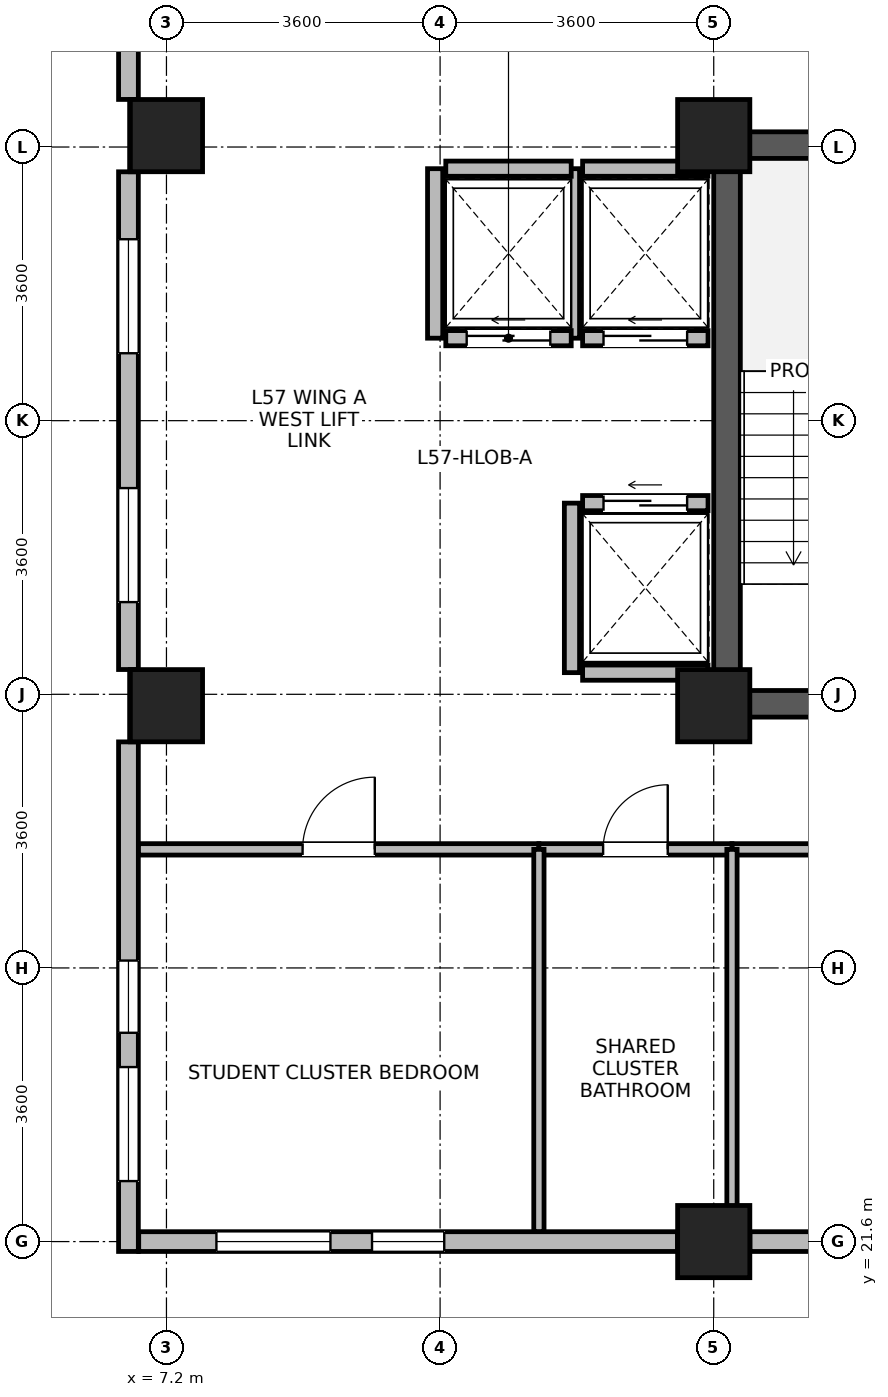
"""IFC4 building model, lengths in metres.
Left out: names, types, materials, properties, quantities, classifications, styles, units other than length and angle.
Written with IfcOpenShell. Run it as: python <this file> out.ifc"""

import sys

from ifc_helpers import new_model, si_unit, direction, frame, frame_2d, origin, origin_2d, place, context, subcontext, project, spatial, rectangle, extrude, source, transform, mapped, element, fill, save


model = new_model("IFC4")
c1 = context("Model", 3, precision=1e-05, world=origin(), true_north=direction((0.0, 1.0)))
c2 = subcontext(c1, "Body", "Model", "MODEL_VIEW")
j1 = project(units=[si_unit("LENGTHUNIT", "METRE"), si_unit("PLANEANGLEUNIT", "RADIAN")], contexts=[c1])
p1 = place(None, origin())
s1 = spatial("IfcSite", under=j1, at=p1, CompositionType="ELEMENT")
p2 = place(p1, origin())
s2 = spatial("IfcBuilding", under=s1, at=p2, CompositionType="ELEMENT")
p3 = place(p2, frame((0.0, 0.0, 224.0)))
s3 = spatial("IfcBuildingStorey", under=s2, at=p3, CompositionType="ELEMENT", Elevation=224.0)
p4 = place(p3, frame((14.575, 28.5, 0.0), z_axis=(0.0, 0.0, 1.0), x_axis=(0.0, 1.0, 0.0)))
e1 = element("IfcWall", 1, at=p4, inside=s3, PredefinedType="SHEAR", context=c2, shape_type="SweptSolid", body=[
    extrude(rectangle(XDim=7.7, YDim=0.35, at=frame_2d((3.85, 0.0))), origin(), (0.0, 0.0, 1.0), 3.47),
])
for number, where, z_axis, x_axis in (
    (2, (14.75, 28.675, 0.0), (0.0, 0.0, 1.0), (1.0, 0.0, 0.0)),
    (3, (14.75, 36.025, 0.0), (0.0, 0.0, 1.0), (1.0, 0.0, 0.0)),
):
    element("IfcWall", number, at=place(p3, frame(where, z_axis=z_axis, x_axis=x_axis)), inside=s3, PredefinedType="SHEAR", context=c2, shape_type="SweptSolid", body=[
        extrude(rectangle(XDim=3.2, YDim=0.35, at=frame_2d((1.6, 0.0))), origin(), (0.0, 0.0, 1.0), 3.47),
    ])
m1 = source(origin(), c2, "Body", "SweptSolid", [
    extrude(rectangle(XDim=0.95, YDim=0.95, at=origin_2d()), origin(), (0.0, 0.0, 1.0), 3.7),
])
for number, where, z_axis, x_axis in (
    (4, (7.2, 28.65, 0.0), (0.0, 0.0, 1.0), (1.0, 0.0, 0.0)),
    (5, (7.2, 36.15, 0.0), (0.0, 0.0, 1.0), (1.0, 0.0, 0.0)),
    (6, (14.4, 21.6, 0.0), (0.0, 0.0, 1.0), (1.0, 0.0, 0.0)),
    (7, (14.4, 28.65, 0.0), (0.0, 0.0, 1.0), (1.0, 0.0, 0.0)),
    (8, (14.4, 36.15, 0.0), (0.0, 0.0, 1.0), (1.0, 0.0, 0.0)),
):
    element("IfcColumn", number, at=place(p3, frame(where, z_axis=z_axis, x_axis=x_axis)), inside=s3, PredefinedType="COLUMN", context=c2, shape_type="MappedRepresentation", body=[
        mapped(m1, transform((0.0, 0.0, 0.0), x_axis=(1.0, 0.0, 0.0), y_axis=(0.0, 1.0, 0.0), z_axis=(0.0, 0.0, 1.0), scale=1.0)),
    ])
p5 = place(p3, frame((6.7, 36.626, 0.0), z_axis=(0.0, 0.0, 1.0), x_axis=(0.0, 1.0, 0.0)))
e9 = element("IfcWall", 9, at=p5, inside=s3, PredefinedType="STANDARD", context=c2, shape_type="SweptSolid", body=[
    extrude(rectangle(XDim=3.104, YDim=0.26, at=frame_2d((1.552, 0.0))), origin(), (0.0, 0.0, 1.0), 3.45),
])
p6 = place(p5, frame((0.802, 0.0, 0.85)))
e10 = element("IfcOpeningElement", 10, at=p6, cuts=e9, PredefinedType="OPENING", context=c2, shape_type="SweptSolid", body=[
    extrude(rectangle(XDim=1.5, YDim=1.85, at=frame_2d((0.75, 0.925))), frame((0.0, 0.14, 0.0), z_axis=(0.0, -1.0, 0.0), x_axis=(1.0, 0.0, 0.0)), (0.0, 0.0, 1.0), 0.28),
])
p7 = place(p3, frame((6.7, 29.126, 0.0), z_axis=(0.0, 0.0, 1.0), x_axis=(0.0, 1.0, 0.0)))
e11 = element("IfcWall", 11, at=p7, inside=s3, PredefinedType="STANDARD", context=c2, shape_type="SweptSolid", body=[
    extrude(rectangle(XDim=6.548, YDim=0.26, at=frame_2d((3.274, 0.0))), origin(), (0.0, 0.0, 1.0), 3.45),
])
p8 = place(p7, frame((0.887, 0.0, 0.85)))
e12 = element("IfcOpeningElement", 12, at=p8, cuts=e11, PredefinedType="OPENING", context=c2, shape_type="SweptSolid", body=[
    extrude(rectangle(XDim=1.5, YDim=1.85, at=frame_2d((0.75, 0.925))), frame((0.0, 0.14, 0.0), z_axis=(0.0, -1.0, 0.0), x_axis=(1.0, 0.0, 0.0)), (0.0, 0.0, 1.0), 0.28),
])
p9 = place(p7, frame((4.161, 0.0, 0.85)))
e13 = element("IfcOpeningElement", 13, at=p9, cuts=e11, PredefinedType="OPENING", context=c2, shape_type="SweptSolid", body=[
    extrude(rectangle(XDim=1.5, YDim=1.85, at=frame_2d((0.75, 0.925))), frame((0.0, 0.14, 0.0), z_axis=(0.0, -1.0, 0.0), x_axis=(1.0, 0.0, 0.0)), (0.0, 0.0, 1.0), 0.28),
])
p10 = place(p3, frame((6.7, 21.47, 0.0), z_axis=(0.0, 0.0, 1.0), x_axis=(0.0, 1.0, 0.0)))
e14 = element("IfcWall", 14, at=p10, inside=s3, PredefinedType="STANDARD", context=c2, shape_type="SweptSolid", body=[
    extrude(rectangle(XDim=6.704, YDim=0.26, at=frame_2d((3.352, 0.0))), origin(), (0.0, 0.0, 1.0), 3.45),
])
p11 = place(p10, frame((0.926, 0.0, 0.85)))
e15 = element("IfcOpeningElement", 15, at=p11, cuts=e14, PredefinedType="OPENING", context=c2, shape_type="SweptSolid", body=[
    extrude(rectangle(XDim=1.5, YDim=1.85, at=frame_2d((0.75, 0.925))), frame((0.0, 0.14, 0.0), z_axis=(0.0, -1.0, 0.0), x_axis=(1.0, 0.0, 0.0)), (0.0, 0.0, 1.0), 0.28),
])
p12 = place(p10, frame((2.877, 0.0, 0.85)))
e16 = element("IfcOpeningElement", 16, at=p12, cuts=e14, PredefinedType="OPENING", context=c2, shape_type="SweptSolid", body=[
    extrude(rectangle(XDim=0.95, YDim=1.75, at=frame_2d((0.475, 0.875))), frame((0.0, 0.14, 0.0), z_axis=(0.0, -1.0, 0.0), x_axis=(1.0, 0.0, 0.0)), (0.0, 0.0, 1.0), 0.28),
])
p13 = place(p3, frame((13.924, 21.6, 0.0), z_axis=(0.0, 0.0, 1.0), x_axis=(-1.0, 0.0, 0.0)))
e17 = element("IfcWall", 17, at=p13, inside=s3, PredefinedType="STANDARD", context=c2, shape_type="SweptSolid", body=[
    extrude(rectangle(XDim=7.089, YDim=0.26, at=frame_2d((3.544, 0.0))), origin(), (0.0, 0.0, 1.0), 3.45),
])
p14 = place(p13, frame((4.567, 0.0, 0.85)))
e18 = element("IfcOpeningElement", 18, at=p14, cuts=e17, PredefinedType="OPENING", context=c2, shape_type="SweptSolid", body=[
    extrude(rectangle(XDim=1.5, YDim=1.85, at=frame_2d((0.75, 0.925))), frame((0.0, 0.14, 0.0), z_axis=(0.0, -1.0, 0.0), x_axis=(1.0, 0.0, 0.0)), (0.0, 0.0, 1.0), 0.28),
])
p15 = place(p13, frame((3.07, 0.0, 0.85)))
e19 = element("IfcOpeningElement", 19, at=p15, cuts=e17, PredefinedType="OPENING", context=c2, shape_type="SweptSolid", body=[
    extrude(rectangle(XDim=0.95, YDim=1.75, at=frame_2d((0.475, 0.875))), frame((0.0, 0.14, 0.0), z_axis=(0.0, -1.0, 0.0), x_axis=(1.0, 0.0, 0.0)), (0.0, 0.0, 1.0), 0.28),
])
p16 = place(p3, frame((17.8, 21.6, 0.0), z_axis=(0.0, 0.0, 1.0), x_axis=(-1.0, 0.0, 0.0)))
e20 = element("IfcWall", 20, at=p16, inside=s3, PredefinedType="STANDARD", context=c2, shape_type="SweptSolid", body=[
    extrude(rectangle(XDim=2.924, YDim=0.26, at=frame_2d((1.462, 0.0))), origin(), (0.0, 0.0, 1.0), 3.05),
])
p17 = place(p16, frame((0.987, 0.0, 0.85)))
e21 = element("IfcOpeningElement", 21, at=p17, cuts=e20, PredefinedType="OPENING", context=c2, shape_type="SweptSolid", body=[
    extrude(rectangle(XDim=0.95, YDim=1.75, at=frame_2d((0.475, 0.875))), frame((0.0, 0.14, 0.0), z_axis=(0.0, -1.0, 0.0), x_axis=(1.0, 0.0, 0.0)), (0.0, 0.0, 1.0), 0.28),
])
p18 = place(p3, frame((12.675, 33.485, 0.0), z_axis=(0.0, 0.0, 1.0), x_axis=(1.0, 0.0, 0.0)))
e22 = element("IfcWall", 22, at=p18, inside=s3, PredefinedType="PARTITIONING", context=c2, shape_type="SweptSolid", body=[
    extrude(rectangle(XDim=1.65, YDim=0.2, at=frame_2d((0.825, 0.0))), origin(), (0.0, 0.0, 1.0), 3.45),
])
p19 = place(p18, frame((0.275, 0.0, 0.0)))
e23 = element("IfcOpeningElement", 23, at=p19, cuts=e22, PredefinedType="OPENING", context=c2, shape_type="SweptSolid", body=[
    extrude(rectangle(XDim=1.1, YDim=2.12, at=frame_2d((0.55, 1.06))), frame((0.0, 0.11, 0.0), z_axis=(0.0, -1.0, 0.0), x_axis=(1.0, 0.0, 0.0)), (0.0, 0.0, 1.0), 0.22),
])
p20 = place(p3, frame((12.675, 35.715, 0.0), z_axis=(0.0, 0.0, 1.0), x_axis=(1.0, 0.0, 0.0)))
e24 = element("IfcWall", 24, at=p20, inside=s3, PredefinedType="PARTITIONING", context=c2, shape_type="SweptSolid", body=[
    extrude(rectangle(XDim=1.65, YDim=0.2, at=frame_2d((0.825, 0.0))), origin(), (0.0, 0.0, 1.0), 3.45),
])
p21 = place(p3, frame((12.535, 33.485, 0.0), z_axis=(0.0, 0.0, 1.0), x_axis=(0.0, 1.0, 0.0)))
e25 = element("IfcWall", 25, at=p21, inside=s3, PredefinedType="PARTITIONING", context=c2, shape_type="SweptSolid", body=[
    extrude(rectangle(XDim=2.23, YDim=0.2, at=frame_2d((1.115, 0.0))), origin(), (0.0, 0.0, 1.0), 3.45),
])
p22 = place(p3, frame((12.675, 29.085, 0.0), z_axis=(0.0, 0.0, 1.0), x_axis=(1.0, 0.0, 0.0)))
e26 = element("IfcWall", 26, at=p22, inside=s3, PredefinedType="PARTITIONING", context=c2, shape_type="SweptSolid", body=[
    extrude(rectangle(XDim=1.65, YDim=0.2, at=frame_2d((0.825, 0.0))), origin(), (0.0, 0.0, 1.0), 3.45),
])
p23 = place(p3, frame((12.675, 31.315, 0.0), z_axis=(0.0, 0.0, 1.0), x_axis=(1.0, 0.0, 0.0)))
e27 = element("IfcWall", 27, at=p23, inside=s3, PredefinedType="PARTITIONING", context=c2, shape_type="SweptSolid", body=[
    extrude(rectangle(XDim=1.65, YDim=0.2, at=frame_2d((0.825, 0.0))), origin(), (0.0, 0.0, 1.0), 3.45),
])
p24 = place(p23, frame((0.275, 0.0, 0.0)))
e28 = element("IfcOpeningElement", 28, at=p24, cuts=e27, PredefinedType="OPENING", context=c2, shape_type="SweptSolid", body=[
    extrude(rectangle(XDim=1.1, YDim=2.12, at=frame_2d((0.55, 1.06))), frame((0.0, 0.11, 0.0), z_axis=(0.0, -1.0, 0.0), x_axis=(1.0, 0.0, 0.0)), (0.0, 0.0, 1.0), 0.22),
])
p25 = place(p3, frame((12.535, 29.085, 0.0), z_axis=(0.0, 0.0, 1.0), x_axis=(0.0, 1.0, 0.0)))
e29 = element("IfcWall", 29, at=p25, inside=s3, PredefinedType="PARTITIONING", context=c2, shape_type="SweptSolid", body=[
    extrude(rectangle(XDim=2.23, YDim=0.2, at=frame_2d((1.115, 0.0))), origin(), (0.0, 0.0, 1.0), 3.45),
])
p26 = place(p3, frame((10.875, 33.485, 0.0), z_axis=(0.0, 0.0, 1.0), x_axis=(1.0, 0.0, 0.0)))
e30 = element("IfcWall", 30, at=p26, inside=s3, PredefinedType="PARTITIONING", context=c2, shape_type="SweptSolid", body=[
    extrude(rectangle(XDim=1.65, YDim=0.2, at=frame_2d((0.825, 0.0))), origin(), (0.0, 0.0, 1.0), 3.45),
])
p27 = place(p26, frame((0.275, 0.0, 0.0)))
e31 = element("IfcOpeningElement", 31, at=p27, cuts=e30, PredefinedType="OPENING", context=c2, shape_type="SweptSolid", body=[
    extrude(rectangle(XDim=1.1, YDim=2.12, at=frame_2d((0.55, 1.06))), frame((0.0, 0.11, 0.0), z_axis=(0.0, -1.0, 0.0), x_axis=(1.0, 0.0, 0.0)), (0.0, 0.0, 1.0), 0.22),
])
p28 = place(p3, frame((10.875, 35.715, 0.0), z_axis=(0.0, 0.0, 1.0), x_axis=(1.0, 0.0, 0.0)))
e32 = element("IfcWall", 32, at=p28, inside=s3, PredefinedType="PARTITIONING", context=c2, shape_type="SweptSolid", body=[
    extrude(rectangle(XDim=1.65, YDim=0.2, at=frame_2d((0.825, 0.0))), origin(), (0.0, 0.0, 1.0), 3.45),
])
p29 = place(p3, frame((10.735, 33.485, 0.0), z_axis=(0.0, 0.0, 1.0), x_axis=(0.0, 1.0, 0.0)))
e33 = element("IfcWall", 33, at=p29, inside=s3, PredefinedType="PARTITIONING", context=c2, shape_type="SweptSolid", body=[
    extrude(rectangle(XDim=2.23, YDim=0.2, at=frame_2d((1.115, 0.0))), origin(), (0.0, 0.0, 1.0), 3.45),
])
p30 = place(p3, frame((14.64, 26.76, 0.0), z_axis=(0.0, 0.0, 1.0), x_axis=(1.0, 0.0, 0.0)))
e34 = element("IfcWall", 34, at=p30, inside=s3, PredefinedType="PARTITIONING", context=c2, shape_type="SweptSolid", body=[
    extrude(rectangle(XDim=5.82, YDim=0.15, at=frame_2d((2.91, 0.0))), origin(), (0.0, 0.0, 1.0), 3.45),
])
p31 = place(p30, frame((2.435, 0.0, 0.0)))
e35 = element("IfcOpeningElement", 35, at=p31, cuts=e34, PredefinedType="OPENING", context=c2, shape_type="SweptSolid", body=[
    extrude(rectangle(XDim=0.95, YDim=2.1, at=frame_2d((0.475, 1.05))), frame((0.0, 0.085, 0.0), z_axis=(0.0, -1.0, 0.0), x_axis=(1.0, 0.0, 0.0)), (0.0, 0.0, 1.0), 0.17),
])
p32 = place(p3, frame((6.832, 26.76, 0.0), z_axis=(0.0, 0.0, 1.0), x_axis=(1.0, 0.0, 0.0)))
e36 = element("IfcWall", 36, at=p32, inside=s3, PredefinedType="PARTITIONING", context=c2, shape_type="SweptSolid", body=[
    extrude(rectangle(XDim=5.268, YDim=0.15, at=frame_2d((2.634, 0.0))), origin(), (0.0, 0.0, 1.0), 3.45),
])
p33 = place(p32, frame((2.159, 0.0, 0.0)))
e37 = element("IfcOpeningElement", 37, at=p33, cuts=e36, PredefinedType="OPENING", context=c2, shape_type="SweptSolid", body=[
    extrude(rectangle(XDim=0.95, YDim=2.1, at=frame_2d((0.475, 1.05))), frame((0.0, 0.085, 0.0), z_axis=(0.0, -1.0, 0.0), x_axis=(1.0, 0.0, 0.0)), (0.0, 0.0, 1.0), 0.17),
])
p34 = place(p3, frame((12.1, 26.76, 0.0), z_axis=(0.0, 0.0, 1.0), x_axis=(1.0, 0.0, 0.0)))
e38 = element("IfcWall", 38, at=p34, inside=s3, PredefinedType="PARTITIONING", context=c2, shape_type="SweptSolid", body=[
    extrude(rectangle(XDim=2.54, YDim=0.15, at=frame_2d((1.27, 0.0))), origin(), (0.0, 0.0, 1.0), 3.45),
])
p35 = place(p34, frame((0.845, 0.0, 0.0)))
e39 = element("IfcOpeningElement", 39, at=p35, cuts=e38, PredefinedType="OPENING", context=c2, shape_type="SweptSolid", body=[
    extrude(rectangle(XDim=0.85, YDim=2.04, at=frame_2d((0.425, 1.02))), frame((0.0, 0.085, 0.0), z_axis=(0.0, -1.0, 0.0), x_axis=(1.0, 0.0, 0.0)), (0.0, 0.0, 1.0), 0.17),
])
for number, where, z_axis, x_axis in (
    (40, (12.1, 21.732, 0.0), (0.0, 0.0, 1.0), (0.0, 1.0, 0.0)),
    (41, (14.64, 21.732, 0.0), (0.0, 0.0, 1.0), (0.0, 1.0, 0.0)),
):
    element("IfcWall", number, at=place(p3, frame(where, z_axis=z_axis, x_axis=x_axis)), inside=s3, PredefinedType="PARTITIONING", context=c2, shape_type="SweptSolid", body=[
        extrude(rectangle(XDim=5.028, YDim=0.135, at=frame_2d((2.514, 0.0))), origin(), (0.0, 0.0, 1.0), 3.45),
    ])
p36 = place(p8, origin())
e42 = element("IfcWindow", 42, at=p36, inside=s3, PartitioningType="SINGLE_PANEL", PredefinedType="WINDOW", context=c2, shape_type="SweptSolid", body=[
    extrude(rectangle(XDim=1.5, YDim=1.85, at=frame_2d((0.75, 0.925))), frame((0.0, 0.03, 0.0), z_axis=(0.0, -1.0, 0.0), x_axis=(1.0, 0.0, 0.0)), (0.0, 0.0, 1.0), 0.06),
])
fill(e12, e42)
p37 = place(p9, origin())
e43 = element("IfcWindow", 43, at=p37, inside=s3, PartitioningType="SINGLE_PANEL", PredefinedType="WINDOW", context=c2, shape_type="SweptSolid", body=[
    extrude(rectangle(XDim=1.5, YDim=1.85, at=frame_2d((0.75, 0.925))), frame((0.0, 0.03, 0.0), z_axis=(0.0, -1.0, 0.0), x_axis=(1.0, 0.0, 0.0)), (0.0, 0.0, 1.0), 0.06),
])
fill(e13, e43)
p38 = place(p11, origin())
e44 = element("IfcWindow", 44, at=p38, inside=s3, PartitioningType="SINGLE_PANEL", PredefinedType="WINDOW", context=c2, shape_type="SweptSolid", body=[
    extrude(rectangle(XDim=1.5, YDim=1.85, at=frame_2d((0.75, 0.925))), frame((0.0, 0.03, 0.0), z_axis=(0.0, -1.0, 0.0), x_axis=(1.0, 0.0, 0.0)), (0.0, 0.0, 1.0), 0.06),
])
fill(e15, e44)
p39 = place(p12, origin())
e45 = element("IfcWindow", 45, at=p39, inside=s3, PartitioningType="SINGLE_PANEL", PredefinedType="WINDOW", context=c2, shape_type="SweptSolid", body=[
    extrude(rectangle(XDim=0.95, YDim=1.75, at=frame_2d((0.475, 0.875))), frame((0.0, 0.03, 0.0), z_axis=(0.0, -1.0, 0.0), x_axis=(1.0, 0.0, 0.0)), (0.0, 0.0, 1.0), 0.06),
])
fill(e16, e45)
p40 = place(p14, origin())
e46 = element("IfcWindow", 46, at=p40, inside=s3, PartitioningType="SINGLE_PANEL", PredefinedType="WINDOW", context=c2, shape_type="SweptSolid", body=[
    extrude(rectangle(XDim=1.5, YDim=1.85, at=frame_2d((0.75, 0.925))), frame((0.0, 0.03, 0.0), z_axis=(0.0, -1.0, 0.0), x_axis=(1.0, 0.0, 0.0)), (0.0, 0.0, 1.0), 0.06),
])
fill(e18, e46)
p41 = place(p15, origin())
e47 = element("IfcWindow", 47, at=p41, inside=s3, PartitioningType="SINGLE_PANEL", PredefinedType="WINDOW", context=c2, shape_type="SweptSolid", body=[
    extrude(rectangle(XDim=0.95, YDim=1.75, at=frame_2d((0.475, 0.875))), frame((0.0, 0.03, 0.0), z_axis=(0.0, -1.0, 0.0), x_axis=(1.0, 0.0, 0.0)), (0.0, 0.0, 1.0), 0.06),
])
fill(e19, e47)
p42 = place(p19, origin())
e48 = element("IfcDoor", 48, at=p42, inside=s3, OperationType="SLIDING_TO_LEFT", PredefinedType="DOOR", context=c2, shape_type="SweptSolid", body=[
    extrude(rectangle(XDim=1.1, YDim=2.12, at=frame_2d((0.55, 1.06))), frame((0.0, 0.025, 0.0), z_axis=(0.0, -1.0, 0.0), x_axis=(1.0, 0.0, 0.0)), (0.0, 0.0, 1.0), 0.05),
])
fill(e23, e48)
p43 = place(p24, origin())
e49 = element("IfcDoor", 49, at=p43, inside=s3, OperationType="SLIDING_TO_LEFT", PredefinedType="DOOR", context=c2, shape_type="SweptSolid", body=[
    extrude(rectangle(XDim=1.1, YDim=2.12, at=frame_2d((0.55, 1.06))), frame((0.0, 0.025, 0.0), z_axis=(0.0, -1.0, 0.0), x_axis=(1.0, 0.0, 0.0)), (0.0, 0.0, 1.0), 0.05),
])
fill(e28, e49)
p44 = place(p27, origin())
e50 = element("IfcDoor", 50, at=p44, inside=s3, OperationType="SLIDING_TO_LEFT", PredefinedType="DOOR", context=c2, shape_type="SweptSolid", body=[
    extrude(rectangle(XDim=1.1, YDim=2.12, at=frame_2d((0.55, 1.06))), frame((0.0, 0.025, 0.0), z_axis=(0.0, -1.0, 0.0), x_axis=(1.0, 0.0, 0.0)), (0.0, 0.0, 1.0), 0.05),
])
fill(e31, e50)
p45 = place(p33, origin())
e51 = element("IfcDoor", 51, at=p45, inside=s3, OperationType="SINGLE_SWING_RIGHT", PredefinedType="DOOR", context=c2, shape_type="SweptSolid", body=[
    extrude(rectangle(XDim=0.95, YDim=2.1, at=frame_2d((0.475, 1.05))), frame((0.0, 0.025, 0.0), z_axis=(0.0, -1.0, 0.0), x_axis=(1.0, 0.0, 0.0)), (0.0, 0.0, 1.0), 0.05),
])
fill(e37, e51)
p46 = place(p35, origin())
e52 = element("IfcDoor", 52, at=p46, inside=s3, OperationType="SINGLE_SWING_RIGHT", PredefinedType="DOOR", context=c2, shape_type="SweptSolid", body=[
    extrude(rectangle(XDim=0.85, YDim=2.04, at=frame_2d((0.425, 1.02))), frame((0.0, 0.025, 0.0), z_axis=(0.0, -1.0, 0.0), x_axis=(1.0, 0.0, 0.0)), (0.0, 0.0, 1.0), 0.05),
])
fill(e39, e52)
save(model, sys.argv[1])
